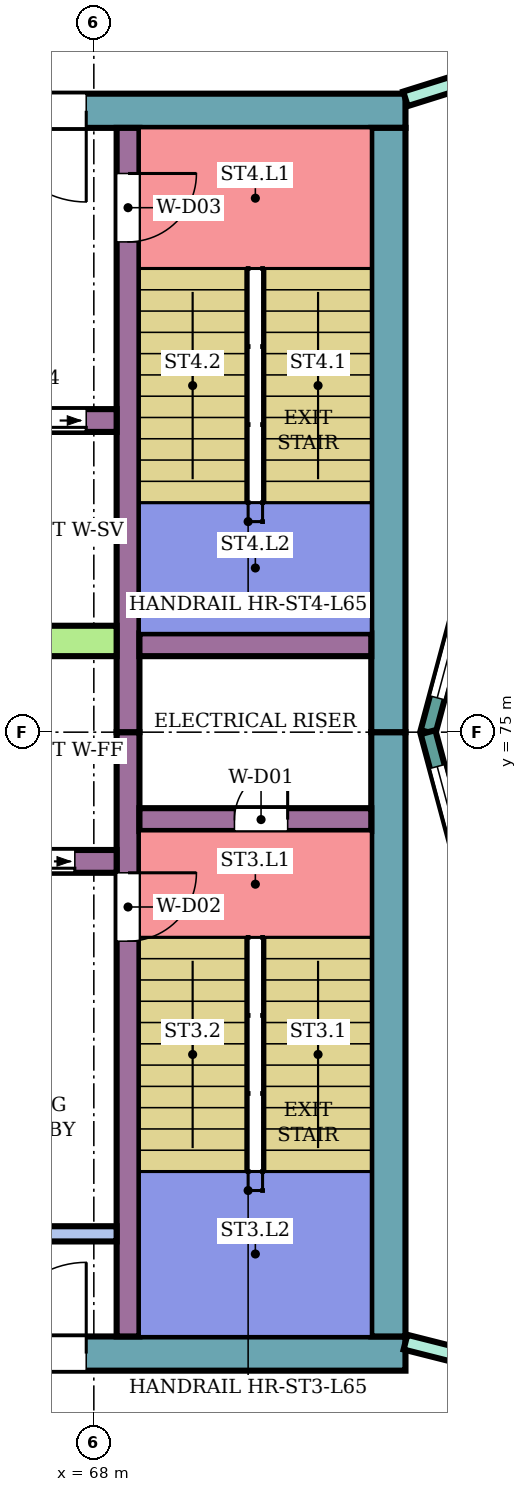
"""IFC4 building model, lengths in metres.
Left out: names, types, materials, properties, quantities, classifications, styles, units other than length and angle.
Written with IfcOpenShell. Run it as: python <this file> out.ifc"""

import sys

from ifc_helpers import new_model, si_unit, direction, frame, frame_2d, origin, place, context, subcontext, project, spatial, rectangle, extrude, element, fill, save


model = new_model("IFC4")
c1 = context("Model", 3, precision=1e-05, world=origin(), true_north=direction((0.0, 1.0)))
c2 = subcontext(c1, "Body", "Model", "MODEL_VIEW")
j1 = project(units=[si_unit("LENGTHUNIT", "METRE"), si_unit("PLANEANGLEUNIT", "RADIAN")], contexts=[c1])
p1 = place(None, origin())
s1 = spatial("IfcSite", under=j1, at=p1, CompositionType="ELEMENT")
p2 = place(p1, origin())
s2 = spatial("IfcBuilding", under=s1, at=p2, CompositionType="ELEMENT")
p3 = place(p2, frame((0.0, 0.0, 284.1)))
s3 = spatial("IfcBuildingStorey", under=s2, at=p3, CompositionType="ELEMENT", Elevation=284.1)
p4 = place(p3, frame((72.1, 66.825, 0.0), z_axis=(0.0, 0.0, 1.0), x_axis=(-1.0, 0.0, 0.0)))
e1 = element("IfcWall", 1, at=p4, inside=s3, PredefinedType="SHEAR", context=c2, shape_type="SweptSolid", body=[
    extrude(rectangle(XDim=13.55, YDim=0.45, at=frame_2d((6.775, 0.0))), origin(), (0.0, 0.0, 1.0), 3.88),
])
p5 = place(p4, frame((4.2, 0.0, 0.0)))
e2 = element("IfcOpeningElement", 2, at=p5, cuts=e1, PredefinedType="OPENING", context=c2, shape_type="SweptSolid", body=[
    extrude(rectangle(XDim=2.4, YDim=2.4, at=frame_2d((1.2, 1.2))), frame((0.0, 0.235, 0.0), z_axis=(0.0, -1.0, 0.0), x_axis=(1.0, 0.0, 0.0)), (0.0, 0.0, 1.0), 0.47),
])
p6 = place(p3, frame((72.1, 83.175, 0.0), z_axis=(0.0, 0.0, 1.0), x_axis=(-1.0, 0.0, 0.0)))
e3 = element("IfcWall", 3, at=p6, inside=s3, PredefinedType="SHEAR", context=c2, shape_type="SweptSolid", body=[
    extrude(rectangle(XDim=13.55, YDim=0.45, at=frame_2d((6.775, 0.0))), origin(), (0.0, 0.0, 1.0), 3.88),
])
p7 = place(p6, frame((4.2, 0.0, 0.0)))
e4 = element("IfcOpeningElement", 4, at=p7, cuts=e3, PredefinedType="OPENING", context=c2, shape_type="SweptSolid", body=[
    extrude(rectangle(XDim=2.4, YDim=2.4, at=frame_2d((1.2, 1.2))), frame((0.0, 0.235, 0.0), z_axis=(0.0, -1.0, 0.0), x_axis=(1.0, 0.0, 0.0)), (0.0, 0.0, 1.0), 0.47),
])
for number, where, z_axis, x_axis in (
    (5, (71.875, 75.0, 0.0), (0.0, 0.0, 1.0), (0.0, -1.0, 0.0)),
    (6, (71.875, 82.95, 0.0), (0.0, 0.0, 1.0), (0.0, -1.0, 0.0)),
):
    element("IfcWall", number, at=place(p3, frame(where, z_axis=z_axis, x_axis=x_axis)), inside=s3, PredefinedType="SHEAR", context=c2, shape_type="SweptSolid", body=[
        extrude(rectangle(XDim=7.95, YDim=0.45, at=frame_2d((3.975, 0.0))), origin(), (0.0, 0.0, 1.0), 3.88),
    ])
p8 = place(p3, frame((68.45, 75.0, 0.0), z_axis=(0.0, 0.0, 1.0), x_axis=(0.0, -1.0, 0.0)))
e7 = element("IfcWall", 7, at=p8, inside=s3, PredefinedType="SHEAR", context=c2, shape_type="SweptSolid", body=[
    extrude(rectangle(XDim=7.95, YDim=0.3, at=frame_2d((3.975, 0.0))), origin(), (0.0, 0.0, 1.0), 3.88),
])
p9 = place(p8, frame((1.85, 0.0, 0.0)))
e8 = element("IfcOpeningElement", 8, at=p9, cuts=e7, PredefinedType="OPENING", context=c2, shape_type="SweptSolid", body=[
    extrude(rectangle(XDim=0.9, YDim=2.1, at=frame_2d((0.45, 1.05))), frame((0.0, 0.16, 0.0), z_axis=(0.0, -1.0, 0.0), x_axis=(1.0, 0.0, 0.0)), (0.0, 0.0, 1.0), 0.32),
])
p10 = place(p3, frame((68.45, 82.95, 0.0), z_axis=(0.0, 0.0, 1.0), x_axis=(0.0, -1.0, 0.0)))
e9 = element("IfcWall", 9, at=p10, inside=s3, PredefinedType="SHEAR", context=c2, shape_type="SweptSolid", body=[
    extrude(rectangle(XDim=7.95, YDim=0.3, at=frame_2d((3.975, 0.0))), origin(), (0.0, 0.0, 1.0), 3.88),
])
p11 = place(p10, frame((0.6, 0.0, 0.0)))
e10 = element("IfcOpeningElement", 10, at=p11, cuts=e9, PredefinedType="OPENING", context=c2, shape_type="SweptSolid", body=[
    extrude(rectangle(XDim=0.9, YDim=2.1, at=frame_2d((0.45, 1.05))), frame((0.0, 0.16, 0.0), z_axis=(0.0, -1.0, 0.0), x_axis=(1.0, 0.0, 0.0)), (0.0, 0.0, 1.0), 0.32),
])
p12 = place(p3, frame((71.65, 73.85, 0.0), z_axis=(0.0, 0.0, 1.0), x_axis=(-1.0, 0.0, 0.0)))
e11 = element("IfcWall", 11, at=p12, inside=s3, PredefinedType="SHEAR", context=c2, shape_type="SweptSolid", body=[
    extrude(rectangle(XDim=3.05, YDim=0.3, at=frame_2d((1.525, 0.0))), origin(), (0.0, 0.0, 1.0), 3.88),
])
p13 = place(p12, frame((1.1, 0.0, 0.0)))
e12 = element("IfcOpeningElement", 12, at=p13, cuts=e11, PredefinedType="OPENING", context=c2, shape_type="SweptSolid", body=[
    extrude(rectangle(XDim=0.7, YDim=2.0, at=frame_2d((0.35, 1.0))), frame((0.0, 0.16, 0.0), z_axis=(0.0, -1.0, 0.0), x_axis=(1.0, 0.0, 0.0)), (0.0, 0.0, 1.0), 0.32),
])
p14 = place(p3, frame((71.65, 76.15, 0.0), z_axis=(0.0, 0.0, 1.0), x_axis=(-1.0, 0.0, 0.0)))
e13 = element("IfcWall", 13, at=p14, inside=s3, PredefinedType="SHEAR", context=c2, shape_type="SweptSolid", body=[
    extrude(rectangle(XDim=3.05, YDim=0.3, at=frame_2d((1.525, 0.0))), origin(), (0.0, 0.0, 1.0), 3.88),
])
p15 = place(p3, frame((68.3, 73.3, 0.0), z_axis=(0.0, 0.0, 1.0), x_axis=(-1.0, 0.0, 0.0)))
e14 = element("IfcWall", 14, at=p15, inside=s3, PredefinedType="SHEAR", context=c2, shape_type="SweptSolid", body=[
    extrude(rectangle(XDim=9.75, YDim=0.3, at=frame_2d((4.875, 0.0))), origin(), (0.0, 0.0, 1.0), 3.88),
])
p16 = place(p15, frame((0.55, 0.0, 0.0)))
e15 = element("IfcOpeningElement", 15, at=p16, cuts=e14, PredefinedType="OPENING", context=c2, shape_type="SweptSolid", body=[
    extrude(rectangle(XDim=1.1, YDim=2.1, at=frame_2d((0.55, 1.05))), frame((0.0, 0.16, 0.0), z_axis=(0.0, -1.0, 0.0), x_axis=(1.0, 0.0, 0.0)), (0.0, 0.0, 1.0), 0.32),
])
p17 = place(p15, frame((3.0, 0.0, 0.0)))
e16 = element("IfcOpeningElement", 16, at=p17, cuts=e14, PredefinedType="OPENING", context=c2, shape_type="SweptSolid", body=[
    extrude(rectangle(XDim=1.2, YDim=2.1, at=frame_2d((0.6, 1.05))), frame((0.0, 0.16, 0.0), z_axis=(0.0, -1.0, 0.0), x_axis=(1.0, 0.0, 0.0)), (0.0, 0.0, 1.0), 0.32),
])
p18 = place(p15, frame((5.5, 0.0, 0.0)))
e17 = element("IfcOpeningElement", 17, at=p18, cuts=e14, PredefinedType="OPENING", context=c2, shape_type="SweptSolid", body=[
    extrude(rectangle(XDim=1.2, YDim=2.1, at=frame_2d((0.6, 1.05))), frame((0.0, 0.16, 0.0), z_axis=(0.0, -1.0, 0.0), x_axis=(1.0, 0.0, 0.0)), (0.0, 0.0, 1.0), 0.32),
])
p19 = place(p15, frame((8.175, 0.0, 0.0)))
e18 = element("IfcOpeningElement", 18, at=p19, cuts=e14, PredefinedType="OPENING", context=c2, shape_type="SweptSolid", body=[
    extrude(rectangle(XDim=0.9, YDim=2.1, at=frame_2d((0.45, 1.05))), frame((0.0, 0.16, 0.0), z_axis=(0.0, -1.0, 0.0), x_axis=(1.0, 0.0, 0.0)), (0.0, 0.0, 1.0), 0.32),
])
p20 = place(p3, frame((68.3, 76.2, 0.0), z_axis=(0.0, 0.0, 1.0), x_axis=(-1.0, 0.0, 0.0)))
e19 = element("IfcWall", 19, at=p20, inside=s3, PredefinedType="SHEAR", context=c2, shape_type="SweptSolid", body=[
    extrude(rectangle(XDim=9.75, YDim=0.4, at=frame_2d((4.875, 0.0))), origin(), (0.0, 0.0, 1.0), 3.88),
])
p21 = place(p3, frame((68.3, 79.1, 0.0), z_axis=(0.0, 0.0, 1.0), x_axis=(-1.0, 0.0, 0.0)))
e20 = element("IfcWall", 20, at=p21, inside=s3, PredefinedType="SHEAR", context=c2, shape_type="SweptSolid", body=[
    extrude(rectangle(XDim=9.75, YDim=0.3, at=frame_2d((4.875, 0.0))), origin(), (0.0, 0.0, 1.0), 3.88),
])
p22 = place(p21, frame((0.4, 0.0, 0.0)))
e21 = element("IfcOpeningElement", 21, at=p22, cuts=e20, PredefinedType="OPENING", context=c2, shape_type="SweptSolid", body=[
    extrude(rectangle(XDim=1.4, YDim=2.1, at=frame_2d((0.7, 1.05))), frame((0.0, 0.16, 0.0), z_axis=(0.0, -1.0, 0.0), x_axis=(1.0, 0.0, 0.0)), (0.0, 0.0, 1.0), 0.32),
])
p23 = place(p21, frame((3.0, 0.0, 0.0)))
e22 = element("IfcOpeningElement", 22, at=p23, cuts=e20, PredefinedType="OPENING", context=c2, shape_type="SweptSolid", body=[
    extrude(rectangle(XDim=1.2, YDim=2.1, at=frame_2d((0.6, 1.05))), frame((0.0, 0.16, 0.0), z_axis=(0.0, -1.0, 0.0), x_axis=(1.0, 0.0, 0.0)), (0.0, 0.0, 1.0), 0.32),
])
p24 = place(p21, frame((5.738, 0.0, 0.0)))
e23 = element("IfcOpeningElement", 23, at=p24, cuts=e20, PredefinedType="OPENING", context=c2, shape_type="SweptSolid", body=[
    extrude(rectangle(XDim=0.9, YDim=2.1, at=frame_2d((0.45, 1.05))), frame((0.0, 0.16, 0.0), z_axis=(0.0, -1.0, 0.0), x_axis=(1.0, 0.0, 0.0)), (0.0, 0.0, 1.0), 0.32),
])
p25 = place(p21, frame((8.113, 0.0, 0.0)))
e24 = element("IfcOpeningElement", 24, at=p25, cuts=e20, PredefinedType="OPENING", context=c2, shape_type="SweptSolid", body=[
    extrude(rectangle(XDim=0.9, YDim=2.1, at=frame_2d((0.45, 1.05))), frame((0.0, 0.16, 0.0), z_axis=(0.0, -1.0, 0.0), x_axis=(1.0, 0.0, 0.0)), (0.0, 0.0, 1.0), 0.32),
])
p26 = place(p3, frame((68.3, 68.4, 0.0), z_axis=(0.0, 0.0, 1.0), x_axis=(-1.0, 0.0, 0.0)))
e25 = element("IfcWall", 25, at=p26, inside=s3, PredefinedType="SHEAR", context=c2, shape_type="SweptSolid", body=[
    extrude(rectangle(XDim=4.15, YDim=0.2, at=frame_2d((2.075, 0.0))), origin(), (0.0, 0.0, 1.0), 3.88),
])
p27 = place(p3, frame((73.415, 78.802, 0.0), z_axis=(0.0, 0.0, 1.0), x_axis=(-0.258789828301, -0.965933654434, 0.0)))
e26 = element("IfcWall", 26, at=p27, inside=s3, PredefinedType="NOTDEFINED", context=c2, shape_type="SweptSolid", body=[
    extrude(rectangle(XDim=3.936, YDim=0.2, at=frame_2d((1.968, 0.0))), origin(), (0.0, 0.0, 1.0), 4.2),
])
p28 = place(p27, frame((0.468, 0.0, 0.9)))
e27 = element("IfcOpeningElement", 27, at=p28, cuts=e26, PredefinedType="OPENING", context=c2, shape_type="SweptSolid", body=[
    extrude(rectangle(XDim=3.0, YDim=2.3, at=frame_2d((1.5, 1.15))), frame((0.0, 0.11, 0.0), z_axis=(0.0, -1.0, 0.0), x_axis=(1.0, 0.0, 0.0)), (0.0, 0.0, 1.0), 0.22),
])
p29 = place(p3, frame((72.396, 75.0, 0.0), z_axis=(0.0, 0.0, 1.0), x_axis=(0.258789828301, -0.965933654434, 0.0)))
e28 = element("IfcWall", 28, at=p29, inside=s3, PredefinedType="NOTDEFINED", context=c2, shape_type="SweptSolid", body=[
    extrude(rectangle(XDim=3.936, YDim=0.2, at=frame_2d((1.968, 0.0))), origin(), (0.0, 0.0, 1.0), 4.2),
])
p30 = place(p29, frame((0.468, 0.0, 0.9)))
e29 = element("IfcOpeningElement", 29, at=p30, cuts=e28, PredefinedType="OPENING", context=c2, shape_type="SweptSolid", body=[
    extrude(rectangle(XDim=3.0, YDim=2.3, at=frame_2d((1.5, 1.15))), frame((0.0, 0.11, 0.0), z_axis=(0.0, -1.0, 0.0), x_axis=(1.0, 0.0, 0.0)), (0.0, 0.0, 1.0), 0.22),
])
p31 = place(p3, frame((72.1, 66.975, 0.0), z_axis=(0.0, 0.0, 1.0), x_axis=(0.969471314457, -0.245204752086, 0.0)))
e30 = element("IfcWall", 30, at=p31, inside=s3, PredefinedType="PARTITIONING", context=c2, shape_type="SweptSolid", body=[
    extrude(rectangle(XDim=2.582, YDim=0.2, at=frame_2d((1.291, 0.0))), origin(), (0.0, 0.0, 1.0), 3.75),
])
p32 = place(p31, frame((0.841, 0.0, 0.0)))
e31 = element("IfcOpeningElement", 31, at=p32, cuts=e30, PredefinedType="OPENING", context=c2, shape_type="SweptSolid", body=[
    extrude(rectangle(XDim=0.9, YDim=2.1, at=frame_2d((0.45, 1.05))), frame((0.0, 0.11, 0.0), z_axis=(0.0, -1.0, 0.0), x_axis=(1.0, 0.0, 0.0)), (0.0, 0.0, 1.0), 0.22),
])
p33 = place(p3, frame((72.1, 83.332, 0.0), z_axis=(0.0, 0.0, 1.0), x_axis=(0.954233106619, 0.299063836383, 0.0)))
e32 = element("IfcWall", 32, at=p33, inside=s3, PredefinedType="PARTITIONING", context=c2, shape_type="SweptSolid", body=[
    extrude(rectangle(XDim=2.414, YDim=0.2, at=frame_2d((1.207, 0.0))), origin(), (0.0, 0.0, 1.0), 3.75),
])
p34 = place(p33, frame((0.762, 0.0, 0.0)))
e33 = element("IfcOpeningElement", 33, at=p34, cuts=e32, PredefinedType="OPENING", context=c2, shape_type="SweptSolid", body=[
    extrude(rectangle(XDim=0.9, YDim=2.1, at=frame_2d((0.45, 1.05))), frame((0.0, 0.11, 0.0), z_axis=(0.0, -1.0, 0.0), x_axis=(1.0, 0.0, 0.0)), (0.0, 0.0, 1.0), 0.22),
])
p35 = place(p28, origin())
e34 = element("IfcWindow", 34, at=p35, inside=s3, PartitioningType="SINGLE_PANEL", PredefinedType="WINDOW", context=c2, shape_type="SweptSolid", body=[
    extrude(rectangle(XDim=3.0, YDim=2.3, at=frame_2d((1.5, 1.15))), frame((0.0, 0.03, 0.0), z_axis=(0.0, -1.0, 0.0), x_axis=(1.0, 0.0, 0.0)), (0.0, 0.0, 1.0), 0.06),
])
fill(e27, e34)
p36 = place(p30, origin())
e35 = element("IfcWindow", 35, at=p36, inside=s3, PartitioningType="SINGLE_PANEL", PredefinedType="WINDOW", context=c2, shape_type="SweptSolid", body=[
    extrude(rectangle(XDim=3.0, YDim=2.3, at=frame_2d((1.5, 1.15))), frame((0.0, 0.03, 0.0), z_axis=(0.0, -1.0, 0.0), x_axis=(1.0, 0.0, 0.0)), (0.0, 0.0, 1.0), 0.06),
])
fill(e29, e35)
p37 = place(p13, frame((0.7, 0.0, 0.0), z_axis=(0.0, 0.0, 1.0), x_axis=(-1.0, 0.0, 0.0)))
e36 = element("IfcDoor", 36, at=p37, inside=s3, OperationType="SINGLE_SWING_RIGHT", PredefinedType="DOOR", context=c2, shape_type="SweptSolid", body=[
    extrude(rectangle(XDim=0.7, YDim=2.0, at=frame_2d((0.35, 1.0))), frame((0.0, 0.025, 0.0), z_axis=(0.0, -1.0, 0.0), x_axis=(1.0, 0.0, 0.0)), (0.0, 0.0, 1.0), 0.05),
])
fill(e12, e36)
p38 = place(p9, origin())
e37 = element("IfcDoor", 37, at=p38, inside=s3, OperationType="SINGLE_SWING_LEFT", PredefinedType="DOOR", context=c2, shape_type="SweptSolid", body=[
    extrude(rectangle(XDim=0.9, YDim=2.1, at=frame_2d((0.45, 1.05))), frame((0.0, 0.025, 0.0), z_axis=(0.0, -1.0, 0.0), x_axis=(1.0, 0.0, 0.0)), (0.0, 0.0, 1.0), 0.05),
])
fill(e8, e37)
p39 = place(p11, origin())
e38 = element("IfcDoor", 38, at=p39, inside=s3, OperationType="SINGLE_SWING_LEFT", PredefinedType="DOOR", context=c2, shape_type="SweptSolid", body=[
    extrude(rectangle(XDim=0.9, YDim=2.1, at=frame_2d((0.45, 1.05))), frame((0.0, 0.025, 0.0), z_axis=(0.0, -1.0, 0.0), x_axis=(1.0, 0.0, 0.0)), (0.0, 0.0, 1.0), 0.05),
])
fill(e10, e38)
p40 = place(p16, origin())
e39 = element("IfcDoor", 39, at=p40, inside=s3, OperationType="DOUBLE_DOOR_SLIDING", PredefinedType="DOOR", context=c2, shape_type="SweptSolid", body=[
    extrude(rectangle(XDim=1.1, YDim=2.1, at=frame_2d((0.55, 1.05))), frame((0.0, 0.025, 0.0), z_axis=(0.0, -1.0, 0.0), x_axis=(1.0, 0.0, 0.0)), (0.0, 0.0, 1.0), 0.05),
])
fill(e15, e39)
p41 = place(p22, origin())
e40 = element("IfcDoor", 40, at=p41, inside=s3, OperationType="DOUBLE_DOOR_SLIDING", PredefinedType="DOOR", context=c2, shape_type="SweptSolid", body=[
    extrude(rectangle(XDim=1.4, YDim=2.1, at=frame_2d((0.7, 1.05))), frame((0.0, 0.025, 0.0), z_axis=(0.0, -1.0, 0.0), x_axis=(1.0, 0.0, 0.0)), (0.0, 0.0, 1.0), 0.05),
])
fill(e21, e40)
p42 = place(p5, frame((2.4, 0.0, 0.0), z_axis=(0.0, 0.0, 1.0), x_axis=(-1.0, 0.0, 0.0)))
e41 = element("IfcDoor", 41, at=p42, inside=s3, OperationType="DOUBLE_DOOR_SINGLE_SWING", PredefinedType="DOOR", context=c2, shape_type="SweptSolid", body=[
    extrude(rectangle(XDim=2.4, YDim=2.4, at=frame_2d((1.2, 1.2))), frame((0.0, 0.025, 0.0), z_axis=(0.0, -1.0, 0.0), x_axis=(1.0, 0.0, 0.0)), (0.0, 0.0, 1.0), 0.05),
])
fill(e2, e41)
p43 = place(p7, origin())
e42 = element("IfcDoor", 42, at=p43, inside=s3, OperationType="DOUBLE_DOOR_SINGLE_SWING", PredefinedType="DOOR", context=c2, shape_type="SweptSolid", body=[
    extrude(rectangle(XDim=2.4, YDim=2.4, at=frame_2d((1.2, 1.2))), frame((0.0, 0.025, 0.0), z_axis=(0.0, -1.0, 0.0), x_axis=(1.0, 0.0, 0.0)), (0.0, 0.0, 1.0), 0.05),
])
fill(e4, e42)
save(model, sys.argv[1])
